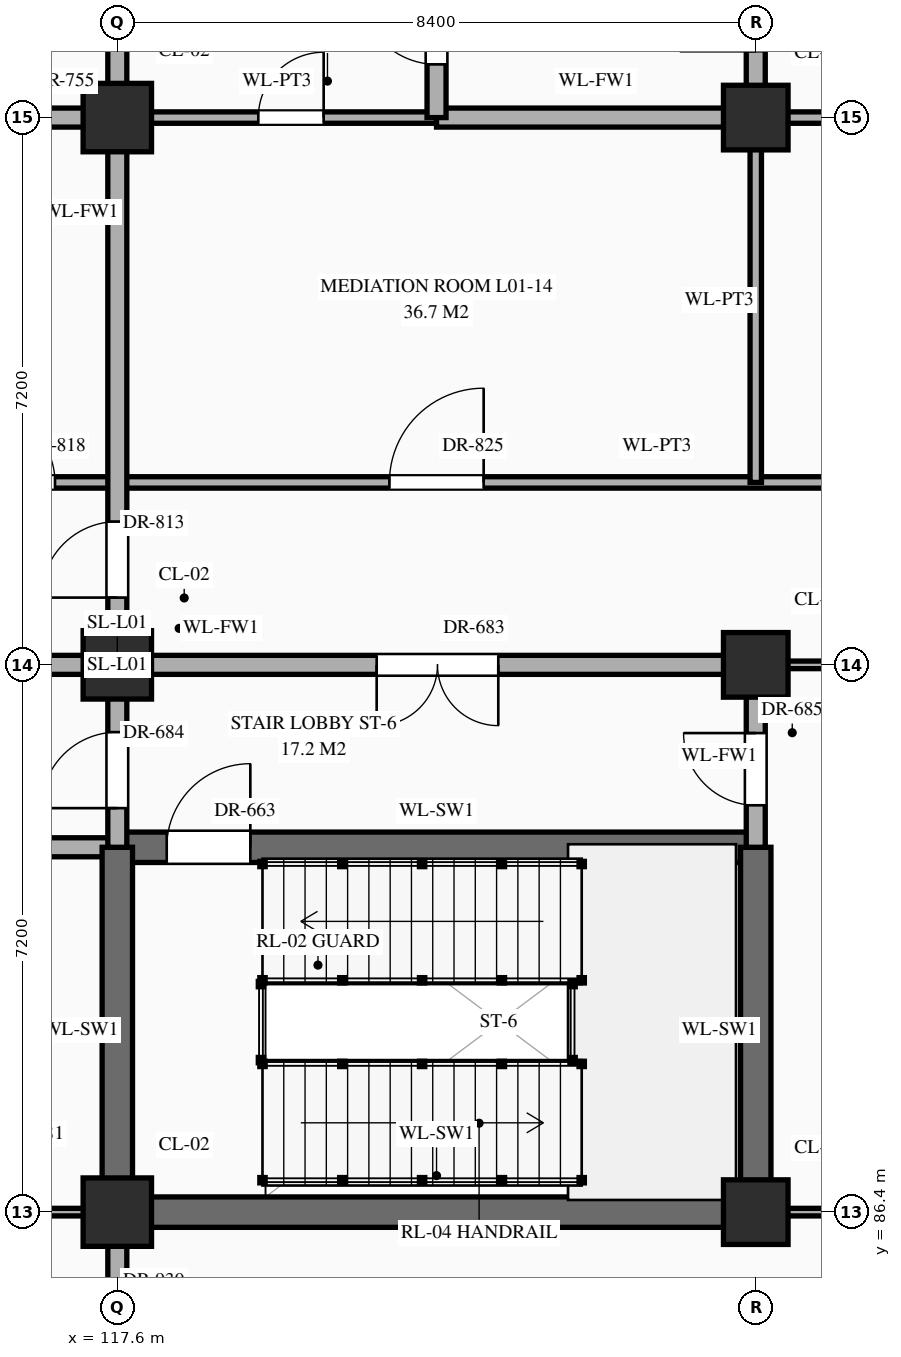
"""IFC4 building model, lengths in metres.
Left out: names, types, materials, properties, quantities, classifications, styles, units other than length and angle.
Written with IfcOpenShell. Run it as: python <this file> out.ifc"""

import sys

from ifc_helpers import new_model, si_unit, direction, frame, frame_2d, origin, origin_2d, place, context, subcontext, project, spatial, rectangle, extrude, element, fill, save


model = new_model("IFC4")
c1 = context("Model", 3, precision=1e-05, world=origin(), true_north=direction((0.0, 1.0)))
c2 = subcontext(c1, "Body", "Model", "MODEL_VIEW")
j1 = project(units=[si_unit("LENGTHUNIT", "METRE"), si_unit("PLANEANGLEUNIT", "RADIAN")], contexts=[c1])
p1 = place(None, origin())
s1 = spatial("IfcSite", under=j1, at=p1, CompositionType="ELEMENT")
p2 = place(p1, origin())
s2 = spatial("IfcBuilding", under=s1, at=p2, CompositionType="ELEMENT")
p3 = place(p2, origin())
s3 = spatial("IfcBuildingStorey", under=s2, at=p3, CompositionType="ELEMENT", Elevation=0.0)
for number, where, z_axis, x_axis in (
    (1, (117.6, 86.4, 0.0), (0.0, 0.0, 1.0), (1.0, 0.0, 0.0)),
    (2, (117.6, 93.6, 0.0), (0.0, 0.0, 1.0), (1.0, 0.0, 0.0)),
    (3, (117.6, 100.8, 0.0), (0.0, 0.0, 1.0), (1.0, 0.0, 0.0)),
):
    element("IfcColumn", number, at=place(p3, frame(where, z_axis=z_axis, x_axis=x_axis)), inside=s3, PredefinedType="COLUMN", context=c2, shape_type="SweptSolid", body=[
        extrude(rectangle(XDim=0.9, YDim=0.9, at=origin_2d()), origin(), (0.0, 0.0, 1.0), 5.4),
    ])
for number, where, z_axis, x_axis in (
    (4, (126.0, 86.4, 0.0), (0.0, 0.0, 1.0), (1.0, 0.0, 0.0)),
    (5, (126.0, 93.6, 0.0), (0.0, 0.0, 1.0), (1.0, 0.0, 0.0)),
    (6, (126.0, 100.8, 0.0), (0.0, 0.0, 1.0), (1.0, 0.0, 0.0)),
):
    element("IfcColumn", number, at=place(p3, frame(where, z_axis=z_axis, x_axis=x_axis)), inside=s3, PredefinedType="COLUMN", context=c2, shape_type="SweptSolid", body=[
        extrude(rectangle(XDim=0.85, YDim=0.85, at=origin_2d()), origin(), (0.0, 0.0, 1.0), 5.4),
    ])
p4 = place(p3, frame((114.8, 86.4, 0.0), z_axis=(0.0, 0.0, 1.0), x_axis=(1.0, 0.0, 0.0)))
e7 = element("IfcWall", 7, at=p4, inside=s3, PredefinedType="STANDARD", context=c2, shape_type="SweptSolid", body=[
    extrude(rectangle(XDim=2.8, YDim=0.1, at=frame_2d((1.4, 0.0))), origin(), (0.0, 0.0, 1.0), 4.27),
])
p5 = place(p4, frame((0.685, 0.0, 0.0)))
e8 = element("IfcOpeningElement", 8, at=p5, cuts=e7, PredefinedType="OPENING", context=c2, shape_type="SweptSolid", body=[
    extrude(rectangle(XDim=1.06, YDim=2.4, at=frame_2d((0.53, 1.2))), frame((0.0, 0.062, 0.0), z_axis=(0.0, -1.0, 0.0), x_axis=(1.0, 0.0, 0.0)), (0.0, 0.0, 1.0), 0.124),
])
p6 = place(p3, frame((117.6, 86.4, 0.0), z_axis=(0.0, 0.0, 1.0), x_axis=(1.0, 0.0, 0.0)))
e9 = element("IfcWall", 9, at=p6, inside=s3, PredefinedType="SHEAR", context=c2, shape_type="SweptSolid", body=[
    extrude(rectangle(XDim=8.4, YDim=0.4, at=frame_2d((4.2, 0.0))), origin(), (0.0, 0.0, 1.0), 5.12),
])
p7 = place(p3, frame((126.0, 86.4, 0.0), z_axis=(0.0, 0.0, 1.0), x_axis=(1.0, 0.0, 0.0)))
e10 = element("IfcWall", 10, at=p7, inside=s3, PredefinedType="STANDARD", context=c2, shape_type="SweptSolid", body=[
    extrude(rectangle(XDim=11.2, YDim=0.1, at=frame_2d((5.6, 0.0))), origin(), (0.0, 0.0, 1.0), 4.27),
])
p8 = place(p7, frame((3.63, 0.0, 0.0)))
e11 = element("IfcOpeningElement", 11, at=p8, cuts=e10, PredefinedType="OPENING", context=c2, shape_type="SweptSolid", body=[
    extrude(rectangle(XDim=1.14, YDim=2.4, at=frame_2d((0.57, 1.2))), frame((0.0, 0.062, 0.0), z_axis=(0.0, -1.0, 0.0), x_axis=(1.0, 0.0, 0.0)), (0.0, 0.0, 1.0), 0.124),
])
p9 = place(p7, frame((9.522, 0.0, 0.0)))
e12 = element("IfcOpeningElement", 12, at=p9, cuts=e10, PredefinedType="OPENING", context=c2, shape_type="SweptSolid", body=[
    extrude(rectangle(XDim=0.9, YDim=2.15, at=frame_2d((0.45, 1.075))), frame((0.0, 0.062, 0.0), z_axis=(0.0, -1.0, 0.0), x_axis=(1.0, 0.0, 0.0)), (0.0, 0.0, 1.0), 0.124),
])
p10 = place(p3, frame((114.8, 91.2, 0.0), z_axis=(0.0, 0.0, 1.0), x_axis=(1.0, 0.0, 0.0)))
e13 = element("IfcWall", 13, at=p10, inside=s3, PredefinedType="STANDARD", context=c2, shape_type="SweptSolid", body=[
    extrude(rectangle(XDim=2.8, YDim=0.25, at=frame_2d((1.4, 0.0))), origin(), (0.0, 0.0, 1.0), 5.12),
])
p11 = place(p3, frame((117.6, 91.2, 0.0), z_axis=(0.0, 0.0, 1.0), x_axis=(1.0, 0.0, 0.0)))
e14 = element("IfcWall", 14, at=p11, inside=s3, PredefinedType="SHEAR", context=c2, shape_type="SweptSolid", body=[
    extrude(rectangle(XDim=8.4, YDim=0.4, at=frame_2d((4.2, 0.0))), origin(), (0.0, 0.0, 1.0), 5.12),
])
p12 = place(p11, frame((0.65, 0.0, 0.0)))
e15 = element("IfcOpeningElement", 15, at=p12, cuts=e14, PredefinedType="OPENING", context=c2, shape_type="SweptSolid", body=[
    extrude(rectangle(XDim=1.1, YDim=2.2, at=frame_2d((0.55, 1.1))), frame((0.0, 0.212, 0.0), z_axis=(0.0, -1.0, 0.0), x_axis=(1.0, 0.0, 0.0)), (0.0, 0.0, 1.0), 0.424),
])
p13 = place(p3, frame((100.8, 93.6, 0.0), z_axis=(0.0, 0.0, 1.0), x_axis=(1.0, 0.0, 0.0)))
e16 = element("IfcWall", 16, at=p13, inside=s3, PredefinedType="STANDARD", context=c2, shape_type="SweptSolid", body=[
    extrude(rectangle(XDim=25.2, YDim=0.25, at=frame_2d((12.6, 0.0))), origin(), (0.0, 0.0, 1.0), 4.27),
])
p14 = place(p13, frame((3.2, 0.0, 0.0)))
e17 = element("IfcOpeningElement", 17, at=p14, cuts=e16, PredefinedType="OPENING", context=c2, shape_type="SweptSolid", body=[
    extrude(rectangle(XDim=2.0, YDim=2.4, at=frame_2d((1.0, 1.2))), frame((0.0, 0.137, 0.0), z_axis=(0.0, -1.0, 0.0), x_axis=(1.0, 0.0, 0.0)), (0.0, 0.0, 1.0), 0.274),
])
p15 = place(p13, frame((20.212, 0.0, 0.0)))
e18 = element("IfcOpeningElement", 18, at=p15, cuts=e16, PredefinedType="OPENING", context=c2, shape_type="SweptSolid", body=[
    extrude(rectangle(XDim=1.6, YDim=2.3, at=frame_2d((0.8, 1.15))), frame((0.0, 0.137, 0.0), z_axis=(0.0, -1.0, 0.0), x_axis=(1.0, 0.0, 0.0)), (0.0, 0.0, 1.0), 0.274),
])
p16 = place(p13, frame((9.485, 0.0, 0.0)))
e19 = element("IfcOpeningElement", 19, at=p16, cuts=e16, PredefinedType="OPENING", context=c2, shape_type="SweptSolid", body=[
    extrude(rectangle(XDim=1.0, YDim=2.2, at=frame_2d((0.5, 1.1))), frame((0.0, 0.137, 0.0), z_axis=(0.0, -1.0, 0.0), x_axis=(1.0, 0.0, 0.0)), (0.0, 0.0, 1.0), 0.274),
])
p17 = place(p13, frame((12.125, 0.0, 0.0)))
e20 = element("IfcOpeningElement", 20, at=p17, cuts=e16, PredefinedType="OPENING", context=c2, shape_type="SweptSolid", body=[
    extrude(rectangle(XDim=0.95, YDim=2.15, at=frame_2d((0.475, 1.075))), frame((0.0, 0.137, 0.0), z_axis=(0.0, -1.0, 0.0), x_axis=(1.0, 0.0, 0.0)), (0.0, 0.0, 1.0), 0.274),
])
p18 = place(p13, frame((14.665, 0.0, 0.0)))
e21 = element("IfcOpeningElement", 21, at=p18, cuts=e16, PredefinedType="OPENING", context=c2, shape_type="SweptSolid", body=[
    extrude(rectangle(XDim=1.1, YDim=2.2, at=frame_2d((0.55, 1.1))), frame((0.0, 0.137, 0.0), z_axis=(0.0, -1.0, 0.0), x_axis=(1.0, 0.0, 0.0)), (0.0, 0.0, 1.0), 0.274),
])
p19 = place(p3, frame((126.0, 93.6, 0.0), z_axis=(0.0, 0.0, 1.0), x_axis=(1.0, 0.0, 0.0)))
e22 = element("IfcWall", 22, at=p19, inside=s3, PredefinedType="STANDARD", context=c2, shape_type="SweptSolid", body=[
    extrude(rectangle(XDim=11.2, YDim=0.1, at=frame_2d((5.6, 0.0))), origin(), (0.0, 0.0, 1.0), 4.27),
])
p20 = place(p19, frame((3.72, 0.0, 0.0)))
e23 = element("IfcOpeningElement", 23, at=p20, cuts=e22, PredefinedType="OPENING", context=c2, shape_type="SweptSolid", body=[
    extrude(rectangle(XDim=0.96, YDim=2.2, at=frame_2d((0.48, 1.1))), frame((0.0, 0.062, 0.0), z_axis=(0.0, -1.0, 0.0), x_axis=(1.0, 0.0, 0.0)), (0.0, 0.0, 1.0), 0.124),
])
p21 = place(p19, frame((9.472, 0.0, 0.0)))
e24 = element("IfcOpeningElement", 24, at=p21, cuts=e22, PredefinedType="OPENING", context=c2, shape_type="SweptSolid", body=[
    extrude(rectangle(XDim=1.0, YDim=2.25, at=frame_2d((0.5, 1.125))), frame((0.0, 0.062, 0.0), z_axis=(0.0, -1.0, 0.0), x_axis=(1.0, 0.0, 0.0)), (0.0, 0.0, 1.0), 0.124),
])
p22 = place(p3, frame((115.0, 96.0, 0.0), z_axis=(0.0, 0.0, 1.0), x_axis=(1.0, 0.0, 0.0)))
e25 = element("IfcWall", 25, at=p22, inside=s3, PredefinedType="STANDARD", context=c2, shape_type="SweptSolid", body=[
    extrude(rectangle(XDim=19.4, YDim=0.15, at=frame_2d((9.7, 0.0))), origin(), (0.0, 0.0, 1.0), 5.12),
])
p23 = place(p22, frame((0.82, 0.0, 0.0)))
e26 = element("IfcOpeningElement", 26, at=p23, cuts=e25, PredefinedType="OPENING", context=c2, shape_type="SweptSolid", body=[
    extrude(rectangle(XDim=0.96, YDim=2.2, at=frame_2d((0.48, 1.1))), frame((0.0, 0.087, 0.0), z_axis=(0.0, -1.0, 0.0), x_axis=(1.0, 0.0, 0.0)), (0.0, 0.0, 1.0), 0.174),
])
p24 = place(p22, frame((6.18, 0.0, 0.0)))
e27 = element("IfcOpeningElement", 27, at=p24, cuts=e25, PredefinedType="OPENING", context=c2, shape_type="SweptSolid", body=[
    extrude(rectangle(XDim=1.24, YDim=2.3, at=frame_2d((0.62, 1.15))), frame((0.0, 0.087, 0.0), z_axis=(0.0, -1.0, 0.0), x_axis=(1.0, 0.0, 0.0)), (0.0, 0.0, 1.0), 0.174),
])
p25 = place(p22, frame((14.56, 0.0, 0.0)))
e28 = element("IfcOpeningElement", 28, at=p25, cuts=e25, PredefinedType="OPENING", context=c2, shape_type="SweptSolid", body=[
    extrude(rectangle(XDim=1.28, YDim=2.35, at=frame_2d((0.64, 1.175))), frame((0.0, 0.087, 0.0), z_axis=(0.0, -1.0, 0.0), x_axis=(1.0, 0.0, 0.0)), (0.0, 0.0, 1.0), 0.174),
])
p26 = place(p3, frame((113.4, 100.8, 0.0), z_axis=(0.0, 0.0, 1.0), x_axis=(1.0, 0.0, 0.0)))
e29 = element("IfcWall", 29, at=p26, inside=s3, PredefinedType="STANDARD", context=c2, shape_type="SweptSolid", body=[
    extrude(rectangle(XDim=4.2, YDim=0.25, at=frame_2d((2.1, 0.0))), origin(), (0.0, 0.0, 1.0), 4.27),
])
p27 = place(p26, frame((0.325, 0.0, 0.0)))
e30 = element("IfcOpeningElement", 30, at=p27, cuts=e29, PredefinedType="OPENING", context=c2, shape_type="SweptSolid", body=[
    extrude(rectangle(XDim=0.95, YDim=2.15, at=frame_2d((0.475, 1.075))), frame((0.0, 0.137, 0.0), z_axis=(0.0, -1.0, 0.0), x_axis=(1.0, 0.0, 0.0)), (0.0, 0.0, 1.0), 0.274),
])
p28 = place(p26, frame((2.165, 0.0, 0.0)))
e31 = element("IfcOpeningElement", 31, at=p28, cuts=e29, PredefinedType="OPENING", context=c2, shape_type="SweptSolid", body=[
    extrude(rectangle(XDim=1.1, YDim=2.2, at=frame_2d((0.55, 1.1))), frame((0.0, 0.137, 0.0), z_axis=(0.0, -1.0, 0.0), x_axis=(1.0, 0.0, 0.0)), (0.0, 0.0, 1.0), 0.274),
])
p29 = place(p3, frame((117.6, 100.8, 0.0), z_axis=(0.0, 0.0, 1.0), x_axis=(1.0, 0.0, 0.0)))
e32 = element("IfcWall", 32, at=p29, inside=s3, PredefinedType="STANDARD", context=c2, shape_type="SweptSolid", body=[
    extrude(rectangle(XDim=4.2, YDim=0.15, at=frame_2d((2.1, 0.0))), origin(), (0.0, 0.0, 1.0), 4.27),
])
p30 = place(p29, frame((1.855, 0.0, 0.0)))
e33 = element("IfcOpeningElement", 33, at=p30, cuts=e32, PredefinedType="OPENING", context=c2, shape_type="SweptSolid", body=[
    extrude(rectangle(XDim=0.86, YDim=2.1, at=frame_2d((0.43, 1.05))), frame((0.0, 0.087, 0.0), z_axis=(0.0, -1.0, 0.0), x_axis=(1.0, 0.0, 0.0)), (0.0, 0.0, 1.0), 0.174),
])
p31 = place(p3, frame((121.8, 100.8, 0.0), z_axis=(0.0, 0.0, 1.0), x_axis=(1.0, 0.0, 0.0)))
e34 = element("IfcWall", 34, at=p31, inside=s3, PredefinedType="STANDARD", context=c2, shape_type="SweptSolid", body=[
    extrude(rectangle(XDim=4.2, YDim=0.25, at=frame_2d((2.1, 0.0))), origin(), (0.0, 0.0, 1.0), 4.27),
])
p32 = place(p3, frame((126.0, 100.8, 0.0), z_axis=(0.0, 0.0, 1.0), x_axis=(1.0, 0.0, 0.0)))
e35 = element("IfcWall", 35, at=p32, inside=s3, PredefinedType="STANDARD", context=c2, shape_type="SweptSolid", body=[
    extrude(rectangle(XDim=8.4, YDim=0.15, at=frame_2d((4.2, 0.0))), origin(), (0.0, 0.0, 1.0), 4.27),
])
p33 = place(p32, frame((3.6, 0.0, 0.0)))
e36 = element("IfcOpeningElement", 36, at=p33, cuts=e35, PredefinedType="OPENING", context=c2, shape_type="SweptSolid", body=[
    extrude(rectangle(XDim=1.2, YDim=2.35, at=frame_2d((0.6, 1.175))), frame((0.0, 0.087, 0.0), z_axis=(0.0, -1.0, 0.0), x_axis=(1.0, 0.0, 0.0)), (0.0, 0.0, 1.0), 0.174),
])
p34 = place(p3, frame((117.6, 79.24, 0.0), z_axis=(0.0, 0.0, 1.0), x_axis=(0.0, 1.0, 0.0)))
e37 = element("IfcWall", 37, at=p34, inside=s3, PredefinedType="STANDARD", context=c2, shape_type="SweptSolid", body=[
    extrude(rectangle(XDim=7.16, YDim=0.25, at=frame_2d((3.58, 0.0))), origin(), (0.0, 0.0, 1.0), 4.37),
])
p35 = place(p34, frame((5.275, 0.0, 0.0)))
e38 = element("IfcOpeningElement", 38, at=p35, cuts=e37, PredefinedType="OPENING", context=c2, shape_type="SweptSolid", body=[
    extrude(rectangle(XDim=1.0, YDim=2.2, at=frame_2d((0.5, 1.1))), frame((0.0, 0.137, 0.0), z_axis=(0.0, -1.0, 0.0), x_axis=(1.0, 0.0, 0.0)), (0.0, 0.0, 1.0), 0.274),
])
p36 = place(p3, frame((117.6, 86.4, 0.0), z_axis=(0.0, 0.0, 1.0), x_axis=(0.0, 1.0, 0.0)))
e39 = element("IfcWall", 39, at=p36, inside=s3, PredefinedType="SHEAR", context=c2, shape_type="SweptSolid", body=[
    extrude(rectangle(XDim=4.8, YDim=0.4, at=frame_2d((2.4, 0.0))), origin(), (0.0, 0.0, 1.0), 5.12),
])
p37 = place(p3, frame((117.6, 91.2, 0.0), z_axis=(0.0, 0.0, 1.0), x_axis=(0.0, 1.0, 0.0)))
e40 = element("IfcWall", 40, at=p37, inside=s3, PredefinedType="STANDARD", context=c2, shape_type="SweptSolid", body=[
    extrude(rectangle(XDim=13.2, YDim=0.25, at=frame_2d((6.6, 0.0))), origin(), (0.0, 0.0, 1.0), 4.37),
])
p38 = place(p37, frame((0.515, 0.0, 0.0)))
e41 = element("IfcOpeningElement", 41, at=p38, cuts=e40, PredefinedType="OPENING", context=c2, shape_type="SweptSolid", body=[
    extrude(rectangle(XDim=1.0, YDim=2.2, at=frame_2d((0.5, 1.1))), frame((0.0, 0.137, 0.0), z_axis=(0.0, -1.0, 0.0), x_axis=(1.0, 0.0, 0.0)), (0.0, 0.0, 1.0), 0.274),
])
p39 = place(p37, frame((10.51, 0.0, 0.0)))
e42 = element("IfcOpeningElement", 42, at=p39, cuts=e40, PredefinedType="OPENING", context=c2, shape_type="SweptSolid", body=[
    extrude(rectangle(XDim=0.95, YDim=2.15, at=frame_2d((0.475, 1.075))), frame((0.0, 0.137, 0.0), z_axis=(0.0, -1.0, 0.0), x_axis=(1.0, 0.0, 0.0)), (0.0, 0.0, 1.0), 0.274),
])
p40 = place(p37, frame((3.285, 0.0, 0.0)))
e43 = element("IfcOpeningElement", 43, at=p40, cuts=e40, PredefinedType="OPENING", context=c2, shape_type="SweptSolid", body=[
    extrude(rectangle(XDim=1.0, YDim=2.2, at=frame_2d((0.5, 1.1))), frame((0.0, 0.137, 0.0), z_axis=(0.0, -1.0, 0.0), x_axis=(1.0, 0.0, 0.0)), (0.0, 0.0, 1.0), 0.274),
])
p41 = place(p3, frame((121.8, 100.8, 0.0), z_axis=(0.0, 0.0, 1.0), x_axis=(0.0, 1.0, 0.0)))
e44 = element("IfcWall", 44, at=p41, inside=s3, PredefinedType="STANDARD", context=c2, shape_type="SweptSolid", body=[
    extrude(rectangle(XDim=3.6, YDim=0.25, at=frame_2d((1.8, 0.0))), origin(), (0.0, 0.0, 1.0), 4.72),
])
p42 = place(p41, frame((0.7, 0.0, 0.0)))
e45 = element("IfcOpeningElement", 45, at=p42, cuts=e44, PredefinedType="OPENING", context=c2, shape_type="SweptSolid", body=[
    extrude(rectangle(XDim=1.0, YDim=2.2, at=frame_2d((0.5, 1.1))), frame((0.0, 0.137, 0.0), z_axis=(0.0, -1.0, 0.0), x_axis=(1.0, 0.0, 0.0)), (0.0, 0.0, 1.0), 0.274),
])
p43 = place(p3, frame((126.0, 86.4, 0.0), z_axis=(0.0, 0.0, 1.0), x_axis=(0.0, 1.0, 0.0)))
e46 = element("IfcWall", 46, at=p43, inside=s3, PredefinedType="SHEAR", context=c2, shape_type="SweptSolid", body=[
    extrude(rectangle(XDim=4.8, YDim=0.4, at=frame_2d((2.4, 0.0))), origin(), (0.0, 0.0, 1.0), 5.12),
])
p44 = place(p3, frame((126.0, 91.2, 0.0), z_axis=(0.0, 0.0, 1.0), x_axis=(0.0, 1.0, 0.0)))
e47 = element("IfcWall", 47, at=p44, inside=s3, PredefinedType="STANDARD", context=c2, shape_type="SweptSolid", body=[
    extrude(rectangle(XDim=2.4, YDim=0.25, at=frame_2d((1.2, 0.0))), origin(), (0.0, 0.0, 1.0), 4.37),
])
p45 = place(p44, frame((0.552, 0.0, 0.0)))
e48 = element("IfcOpeningElement", 48, at=p45, cuts=e47, PredefinedType="OPENING", context=c2, shape_type="SweptSolid", body=[
    extrude(rectangle(XDim=0.95, YDim=2.15, at=frame_2d((0.475, 1.075))), frame((0.0, 0.137, 0.0), z_axis=(0.0, -1.0, 0.0), x_axis=(1.0, 0.0, 0.0)), (0.0, 0.0, 1.0), 0.274),
])
p46 = place(p3, frame((126.0, 96.0, 0.0), z_axis=(0.0, 0.0, 1.0), x_axis=(0.0, 1.0, 0.0)))
e49 = element("IfcWall", 49, at=p46, inside=s3, PredefinedType="STANDARD", context=c2, shape_type="SweptSolid", body=[
    extrude(rectangle(XDim=4.8, YDim=0.15, at=frame_2d((2.4, 0.0))), origin(), (0.0, 0.0, 1.0), 4.37),
])
p47 = place(p3, frame((126.0, 100.8, 0.0), z_axis=(0.0, 0.0, 1.0), x_axis=(0.0, 1.0, 0.0)))
e50 = element("IfcWall", 50, at=p47, inside=s3, PredefinedType="STANDARD", context=c2, shape_type="SweptSolid", body=[
    extrude(rectangle(XDim=3.6, YDim=0.25, at=frame_2d((1.8, 0.0))), origin(), (0.0, 0.0, 1.0), 4.37),
])
p48 = place(p47, frame((0.873, 0.0, 0.0)))
e51 = element("IfcOpeningElement", 51, at=p48, cuts=e50, PredefinedType="OPENING", context=c2, shape_type="SweptSolid", body=[
    extrude(rectangle(XDim=1.0, YDim=2.2, at=frame_2d((0.5, 1.1))), frame((0.0, 0.137, 0.0), z_axis=(0.0, -1.0, 0.0), x_axis=(1.0, 0.0, 0.0)), (0.0, 0.0, 1.0), 0.274),
])
p49 = place(p12, origin())
e52 = element("IfcDoor", 52, at=p49, inside=s3, OperationType="SINGLE_SWING_RIGHT", PredefinedType="DOOR", context=c2, shape_type="SweptSolid", body=[
    extrude(rectangle(XDim=1.1, YDim=2.2, at=frame_2d((0.55, 1.1))), frame((0.0, 0.025, 0.0), z_axis=(0.0, -1.0, 0.0), x_axis=(1.0, 0.0, 0.0)), (0.0, 0.0, 1.0), 0.05),
])
fill(e15, e52)
p50 = place(p15, frame((1.6, 0.0, 0.0), z_axis=(0.0, 0.0, 1.0), x_axis=(-1.0, 0.0, 0.0)))
e53 = element("IfcDoor", 53, at=p50, inside=s3, OperationType="DOUBLE_DOOR_SINGLE_SWING", PredefinedType="DOOR", context=c2, shape_type="SweptSolid", body=[
    extrude(rectangle(XDim=1.6, YDim=2.3, at=frame_2d((0.8, 1.15))), frame((0.0, 0.025, 0.0), z_axis=(0.0, -1.0, 0.0), x_axis=(1.0, 0.0, 0.0)), (0.0, 0.0, 1.0), 0.05),
])
fill(e18, e53)
p51 = place(p38, origin())
e54 = element("IfcDoor", 54, at=p51, inside=s3, OperationType="SINGLE_SWING_LEFT", PredefinedType="DOOR", context=c2, shape_type="SweptSolid", body=[
    extrude(rectangle(XDim=1.0, YDim=2.2, at=frame_2d((0.5, 1.1))), frame((0.0, 0.025, 0.0), z_axis=(0.0, -1.0, 0.0), x_axis=(1.0, 0.0, 0.0)), (0.0, 0.0, 1.0), 0.05),
])
fill(e41, e54)
p52 = place(p45, origin())
e55 = element("IfcDoor", 55, at=p52, inside=s3, OperationType="SINGLE_SWING_RIGHT", PredefinedType="DOOR", context=c2, shape_type="SweptSolid", body=[
    extrude(rectangle(XDim=0.95, YDim=2.15, at=frame_2d((0.475, 1.075))), frame((0.0, 0.025, 0.0), z_axis=(0.0, -1.0, 0.0), x_axis=(1.0, 0.0, 0.0)), (0.0, 0.0, 1.0), 0.05),
])
fill(e48, e55)
p53 = place(p42, origin())
e56 = element("IfcDoor", 56, at=p53, inside=s3, OperationType="SINGLE_SWING_RIGHT", PredefinedType="DOOR", context=c2, shape_type="SweptSolid", body=[
    extrude(rectangle(XDim=1.0, YDim=2.2, at=frame_2d((0.5, 1.1))), frame((0.0, 0.025, 0.0), z_axis=(0.0, -1.0, 0.0), x_axis=(1.0, 0.0, 0.0)), (0.0, 0.0, 1.0), 0.05),
])
fill(e45, e56)
p54 = place(p30, origin())
e57 = element("IfcDoor", 57, at=p54, inside=s3, OperationType="SINGLE_SWING_RIGHT", PredefinedType="DOOR", context=c2, shape_type="SweptSolid", body=[
    extrude(rectangle(XDim=0.86, YDim=2.1, at=frame_2d((0.43, 1.05))), frame((0.0, 0.025, 0.0), z_axis=(0.0, -1.0, 0.0), x_axis=(1.0, 0.0, 0.0)), (0.0, 0.0, 1.0), 0.05),
])
fill(e33, e57)
p55 = place(p40, origin())
e58 = element("IfcDoor", 58, at=p55, inside=s3, OperationType="SINGLE_SWING_LEFT", PredefinedType="DOOR", context=c2, shape_type="SweptSolid", body=[
    extrude(rectangle(XDim=1.0, YDim=2.2, at=frame_2d((0.5, 1.1))), frame((0.0, 0.025, 0.0), z_axis=(0.0, -1.0, 0.0), x_axis=(1.0, 0.0, 0.0)), (0.0, 0.0, 1.0), 0.05),
])
fill(e43, e58)
p56 = place(p23, origin())
e59 = element("IfcDoor", 59, at=p56, inside=s3, OperationType="SINGLE_SWING_LEFT", PredefinedType="DOOR", context=c2, shape_type="SweptSolid", body=[
    extrude(rectangle(XDim=0.96, YDim=2.2, at=frame_2d((0.48, 1.1))), frame((0.0, 0.025, 0.0), z_axis=(0.0, -1.0, 0.0), x_axis=(1.0, 0.0, 0.0)), (0.0, 0.0, 1.0), 0.05),
])
fill(e26, e59)
p57 = place(p24, origin())
e60 = element("IfcDoor", 60, at=p57, inside=s3, OperationType="SINGLE_SWING_RIGHT", PredefinedType="DOOR", context=c2, shape_type="SweptSolid", body=[
    extrude(rectangle(XDim=1.24, YDim=2.3, at=frame_2d((0.62, 1.15))), frame((0.0, 0.025, 0.0), z_axis=(0.0, -1.0, 0.0), x_axis=(1.0, 0.0, 0.0)), (0.0, 0.0, 1.0), 0.05),
])
fill(e27, e60)
save(model, sys.argv[1])
